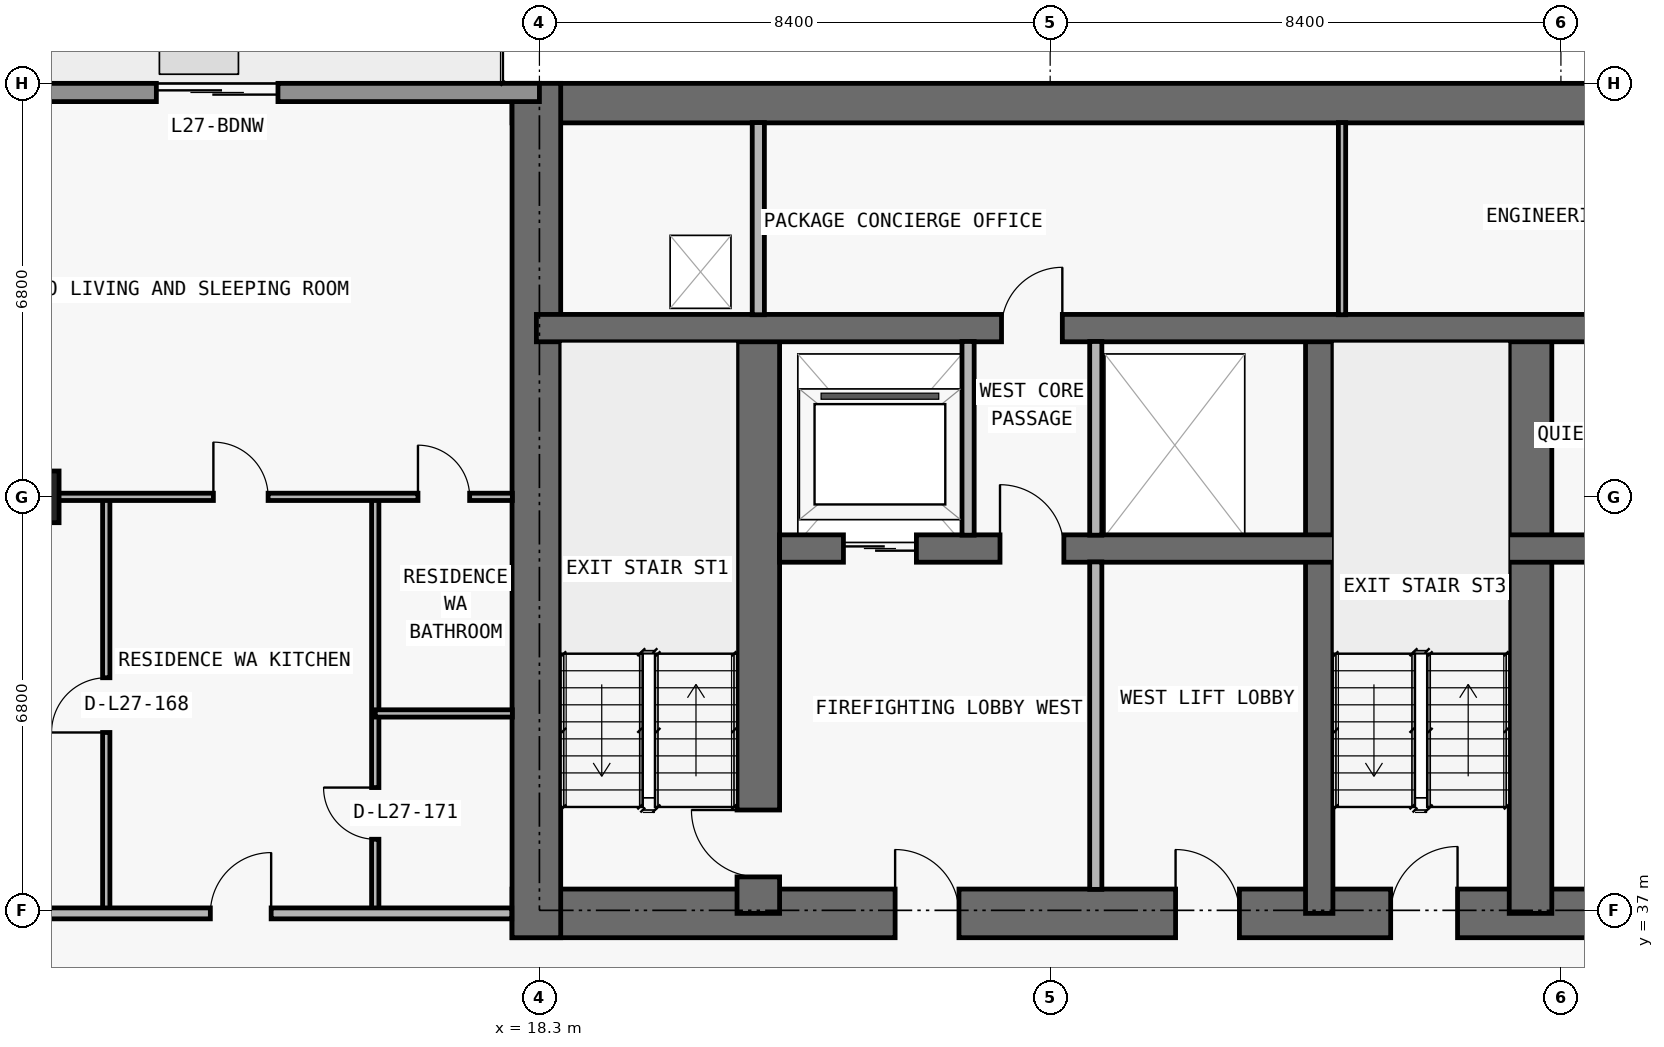
"""IFC4 building model, lengths in metres.
Left out: names, types, materials, properties, quantities, classifications, styles, units other than length and angle.
Written with IfcOpenShell. Run it as: python <this file> out.ifc"""

import sys

from ifc_helpers import new_model, si_unit, direction, frame, frame_2d, origin, origin_2d, place, context, subcontext, project, spatial, rectangle, extrude, element, fill, save


model = new_model("IFC4")
c1 = context("Model", 3, precision=1e-05, world=origin(), true_north=direction((0.0, 1.0)))
c2 = subcontext(c1, "Body", "Model", "MODEL_VIEW")
j1 = project(units=[si_unit("LENGTHUNIT", "METRE"), si_unit("PLANEANGLEUNIT", "RADIAN")], contexts=[c1])
p1 = place(None, origin())
s1 = spatial("IfcSite", under=j1, at=p1, CompositionType="ELEMENT")
p2 = place(p1, origin())
s2 = spatial("IfcBuilding", under=s1, at=p2, CompositionType="ELEMENT")
p3 = place(p2, frame((0.0, 0.0, 102.6)))
s3 = spatial("IfcBuildingStorey", under=s2, at=p3, CompositionType="ELEMENT", Elevation=102.6)
p4 = place(p3, frame((9.9, 43.8, 0.0), z_axis=(0.0, 0.0, 1.0), x_axis=(1.0, 0.0, 0.0)))
e1 = element("IfcColumn", 1, at=p4, inside=s3, PredefinedType="COLUMN", context=c2, shape_type="SweptSolid", body=[
    extrude(rectangle(XDim=1.0, YDim=0.85, at=origin_2d()), origin(), (0.0, 0.0, 1.0), 3.05),
])
p5 = place(p3, frame((17.85, 36.95, 0.0), z_axis=(0.0, 0.0, 1.0), x_axis=(1.0, 0.0, 0.0)))
e2 = element("IfcWall", 2, at=p5, inside=s3, PredefinedType="SHEAR", context=c2, shape_type="SweptSolid", body=[
    extrude(rectangle(XDim=42.1, YDim=0.8, at=frame_2d((21.05, 0.0))), origin(), (0.0, 0.0, 1.0), 3.05),
])
p6 = place(p5, frame((14.45, 0.0, 0.0)))
e3 = element("IfcOpeningElement", 3, at=p6, cuts=e2, PredefinedType="OPENING", context=c2, shape_type="SweptSolid", body=[
    extrude(rectangle(XDim=1.1, YDim=2.15, at=frame_2d((0.55, 1.075))), frame((0.0, 0.41, 0.0), z_axis=(0.0, -1.0, 0.0), x_axis=(1.0, 0.0, 0.0)), (0.0, 0.0, 1.0), 0.82),
])
p7 = place(p5, frame((6.3, 0.0, 0.0)))
e4 = element("IfcOpeningElement", 4, at=p7, cuts=e2, PredefinedType="OPENING", context=c2, shape_type="SweptSolid", body=[
    extrude(rectangle(XDim=1.05, YDim=2.15, at=frame_2d((0.525, 1.075))), frame((0.0, 0.41, 0.0), z_axis=(0.0, -1.0, 0.0), x_axis=(1.0, 0.0, 0.0)), (0.0, 0.0, 1.0), 0.82),
])
p8 = place(p5, frame((34.8, 0.0, 0.0)))
e5 = element("IfcOpeningElement", 5, at=p8, cuts=e2, PredefinedType="OPENING", context=c2, shape_type="SweptSolid", body=[
    extrude(rectangle(XDim=1.05, YDim=2.15, at=frame_2d((0.525, 1.075))), frame((0.0, 0.41, 0.0), z_axis=(0.0, -1.0, 0.0), x_axis=(1.0, 0.0, 0.0)), (0.0, 0.0, 1.0), 0.82),
])
p9 = place(p5, frame((10.913, 0.0, 0.0)))
e6 = element("IfcOpeningElement", 6, at=p9, cuts=e2, PredefinedType="OPENING", context=c2, shape_type="SweptSolid", body=[
    extrude(rectangle(XDim=1.05, YDim=2.15, at=frame_2d((0.525, 1.075))), frame((0.0, 0.41, 0.0), z_axis=(0.0, -1.0, 0.0), x_axis=(1.0, 0.0, 0.0)), (0.0, 0.0, 1.0), 0.82),
])
p10 = place(p5, frame((24.15, 0.0, 0.0)))
e7 = element("IfcOpeningElement", 7, at=p10, cuts=e2, PredefinedType="OPENING", context=c2, shape_type="SweptSolid", body=[
    extrude(rectangle(XDim=1.05, YDim=2.15, at=frame_2d((0.525, 1.075))), frame((0.0, 0.41, 0.0), z_axis=(0.0, -1.0, 0.0), x_axis=(1.0, 0.0, 0.0)), (0.0, 0.0, 1.0), 0.82),
])
p11 = place(p3, frame((17.85, 50.275, 0.0), z_axis=(0.0, 0.0, 1.0), x_axis=(1.0, 0.0, 0.0)))
e8 = element("IfcWall", 8, at=p11, inside=s3, PredefinedType="SHEAR", context=c2, shape_type="SweptSolid", body=[
    extrude(rectangle(XDim=42.1, YDim=0.65, at=frame_2d((21.05, 0.0))), origin(), (0.0, 0.0, 1.0), 3.05),
])
p12 = place(p3, frame((18.25, 36.55, 0.0), z_axis=(0.0, 0.0, 1.0), x_axis=(0.0, 1.0, 0.0)))
e9 = element("IfcWall", 9, at=p12, inside=s3, PredefinedType="SHEAR", context=c2, shape_type="SweptSolid", body=[
    extrude(rectangle(XDim=14.05, YDim=0.8, at=frame_2d((7.025, 0.0))), origin(), (0.0, 0.0, 1.0), 3.05),
])
p13 = place(p3, frame((21.9, 36.95, 0.0), z_axis=(0.0, 0.0, 1.0), x_axis=(0.0, 1.0, 0.0)))
e10 = element("IfcWall", 10, at=p13, inside=s3, PredefinedType="SHEAR", context=c2, shape_type="SweptSolid", body=[
    extrude(rectangle(XDim=9.625, YDim=0.7, at=frame_2d((4.812, 0.0))), origin(), (0.0, 0.0, 1.0), 3.05),
])
p14 = place(p13, frame((0.6, 0.0, 0.0)))
e11 = element("IfcOpeningElement", 11, at=p14, cuts=e10, PredefinedType="OPENING", context=c2, shape_type="SweptSolid", body=[
    extrude(rectangle(XDim=1.1, YDim=2.15, at=frame_2d((0.55, 1.075))), frame((0.0, 0.36, 0.0), z_axis=(0.0, -1.0, 0.0), x_axis=(1.0, 0.0, 0.0)), (0.0, 0.0, 1.0), 0.72),
])
p15 = place(p3, frame((31.125, 36.95, 0.0), z_axis=(0.0, 0.0, 1.0), x_axis=(0.0, 1.0, 0.0)))
e12 = element("IfcWall", 12, at=p15, inside=s3, PredefinedType="SHEAR", context=c2, shape_type="SweptSolid", body=[
    extrude(rectangle(XDim=9.625, YDim=0.45, at=frame_2d((4.812, 0.0))), origin(), (0.0, 0.0, 1.0), 3.05),
])
p16 = place(p3, frame((34.6, 36.95, 0.0), z_axis=(0.0, 0.0, 1.0), x_axis=(0.0, 1.0, 0.0)))
e13 = element("IfcWall", 13, at=p16, inside=s3, PredefinedType="SHEAR", context=c2, shape_type="SweptSolid", body=[
    extrude(rectangle(XDim=9.625, YDim=0.7, at=frame_2d((4.812, 0.0))), origin(), (0.0, 0.0, 1.0), 3.05),
])
p17 = place(p3, frame((22.25, 42.95, 0.0), z_axis=(0.0, 0.0, 1.0), x_axis=(1.0, 0.0, 0.0)))
e14 = element("IfcWall", 14, at=p17, inside=s3, PredefinedType="SHEAR", context=c2, shape_type="SweptSolid", body=[
    extrude(rectangle(XDim=33.3, YDim=0.45, at=frame_2d((16.65, 0.0))), origin(), (0.0, 0.0, 1.0), 3.05),
])
p18 = place(p17, frame((1.05, 0.0, 0.0)))
e15 = element("IfcOpeningElement", 15, at=p18, cuts=e14, PredefinedType="OPENING", context=c2, shape_type="SweptSolid", body=[
    extrude(rectangle(XDim=1.2, YDim=2.2, at=frame_2d((0.6, 1.1))), frame((0.0, 0.235, 0.0), z_axis=(0.0, -1.0, 0.0), x_axis=(1.0, 0.0, 0.0)), (0.0, 0.0, 1.0), 0.47),
])
p19 = place(p17, frame((31.05, 0.0, 0.0)))
e16 = element("IfcOpeningElement", 16, at=p19, cuts=e14, PredefinedType="OPENING", context=c2, shape_type="SweptSolid", body=[
    extrude(rectangle(XDim=1.2, YDim=2.2, at=frame_2d((0.6, 1.1))), frame((0.0, 0.235, 0.0), z_axis=(0.0, -1.0, 0.0), x_axis=(1.0, 0.0, 0.0)), (0.0, 0.0, 1.0), 0.47),
])
p20 = place(p17, frame((21.4, 0.0, 0.0)))
e17 = element("IfcOpeningElement", 17, at=p20, cuts=e14, PredefinedType="OPENING", context=c2, shape_type="SweptSolid", body=[
    extrude(rectangle(XDim=1.1, YDim=2.2, at=frame_2d((0.55, 1.1))), frame((0.0, 0.235, 0.0), z_axis=(0.0, -1.0, 0.0), x_axis=(1.0, 0.0, 0.0)), (0.0, 0.0, 1.0), 0.47),
])
p21 = place(p17, frame((24.0, 0.0, 0.0)))
e18 = element("IfcOpeningElement", 18, at=p21, cuts=e14, PredefinedType="OPENING", context=c2, shape_type="SweptSolid", body=[
    extrude(rectangle(XDim=1.1, YDim=2.2, at=frame_2d((0.55, 1.1))), frame((0.0, 0.235, 0.0), z_axis=(0.0, -1.0, 0.0), x_axis=(1.0, 0.0, 0.0)), (0.0, 0.0, 1.0), 0.47),
])
p22 = place(p17, frame((3.625, 0.0, 0.0)))
e19 = element("IfcOpeningElement", 19, at=p22, cuts=e14, PredefinedType="OPENING", context=c2, shape_type="SweptSolid", body=[
    extrude(rectangle(XDim=1.05, YDim=2.15, at=frame_2d((0.525, 1.075))), frame((0.0, 0.235, 0.0), z_axis=(0.0, -1.0, 0.0), x_axis=(1.0, 0.0, 0.0)), (0.0, 0.0, 1.0), 0.47),
])
p23 = place(p17, frame((28.675, 0.0, 0.0)))
e20 = element("IfcOpeningElement", 20, at=p23, cuts=e14, PredefinedType="OPENING", context=c2, shape_type="SweptSolid", body=[
    extrude(rectangle(XDim=1.05, YDim=2.15, at=frame_2d((0.525, 1.075))), frame((0.0, 0.235, 0.0), z_axis=(0.0, -1.0, 0.0), x_axis=(1.0, 0.0, 0.0)), (0.0, 0.0, 1.0), 0.47),
])
p24 = place(p17, frame((15.975, 0.0, 0.0)))
e21 = element("IfcOpeningElement", 21, at=p24, cuts=e14, PredefinedType="OPENING", context=c2, shape_type="SweptSolid", body=[
    extrude(rectangle(XDim=1.0, YDim=2.2, at=frame_2d((0.5, 1.1))), frame((0.0, 0.235, 0.0), z_axis=(0.0, -1.0, 0.0), x_axis=(1.0, 0.0, 0.0)), (0.0, 0.0, 1.0), 0.47),
])
p25 = place(p3, frame((18.25, 46.575, 0.0), z_axis=(0.0, 0.0, 1.0), x_axis=(1.0, 0.0, 0.0)))
e22 = element("IfcWall", 22, at=p25, inside=s3, PredefinedType="SHEAR", context=c2, shape_type="SweptSolid", body=[
    extrude(rectangle(XDim=41.3, YDim=0.45, at=frame_2d((20.65, 0.0))), origin(), (0.0, 0.0, 1.0), 3.05),
])
p26 = place(p25, frame((7.65, 0.0, 0.0)))
e23 = element("IfcOpeningElement", 23, at=p26, cuts=e22, PredefinedType="OPENING", context=c2, shape_type="SweptSolid", body=[
    extrude(rectangle(XDim=1.0, YDim=2.2, at=frame_2d((0.5, 1.1))), frame((0.0, 0.235, 0.0), z_axis=(0.0, -1.0, 0.0), x_axis=(1.0, 0.0, 0.0)), (0.0, 0.0, 1.0), 0.47),
])
p27 = place(p25, frame((32.675, 0.0, 0.0)))
e24 = element("IfcOpeningElement", 24, at=p27, cuts=e22, PredefinedType="OPENING", context=c2, shape_type="SweptSolid", body=[
    extrude(rectangle(XDim=1.05, YDim=2.15, at=frame_2d((0.525, 1.075))), frame((0.0, 0.235, 0.0), z_axis=(0.0, -1.0, 0.0), x_axis=(1.0, 0.0, 0.0)), (0.0, 0.0, 1.0), 0.47),
])
p28 = place(p3, frame((7.7, 50.45, 0.0), z_axis=(0.0, 0.0, 1.0), x_axis=(1.0, 0.0, 0.0)))
e25 = element("IfcWall", 25, at=p28, inside=s3, PredefinedType="STANDARD", context=c2, shape_type="SweptSolid", body=[
    extrude(rectangle(XDim=10.6, YDim=0.3, at=frame_2d((5.3, 0.0))), origin(), (0.0, 0.0, 1.0), 3.05),
])
p29 = place(p28, frame((4.3, 0.0, 0.0)))
e26 = element("IfcOpeningElement", 26, at=p29, cuts=e25, PredefinedType="OPENING", context=c2, shape_type="SweptSolid", body=[
    extrude(rectangle(XDim=2.0, YDim=2.3, at=frame_2d((1.0, 1.15))), frame((0.0, 0.16, 0.0), z_axis=(0.0, -1.0, 0.0), x_axis=(1.0, 0.0, 0.0)), (0.0, 0.0, 1.0), 0.32),
])
p30 = place(p3, frame((11.176, 36.95, 0.0), z_axis=(0.0, 0.0, 1.0), x_axis=(0.0, 1.0, 0.0)))
e27 = element("IfcWall", 27, at=p30, inside=s3, PredefinedType="PARTITIONING", context=c2, shape_type="SweptSolid", body=[
    extrude(rectangle(XDim=6.85, YDim=0.12, at=frame_2d((3.425, 0.0))), origin(), (0.0, 0.0, 1.0), 3.05),
])
p31 = place(p30, frame((2.975, 0.0, 0.0)))
e28 = element("IfcOpeningElement", 28, at=p31, cuts=e27, PredefinedType="OPENING", context=c2, shape_type="SweptSolid", body=[
    extrude(rectangle(XDim=0.9, YDim=2.15, at=frame_2d((0.45, 1.075))), frame((0.0, 0.07, 0.0), z_axis=(0.0, -1.0, 0.0), x_axis=(1.0, 0.0, 0.0)), (0.0, 0.0, 1.0), 0.14),
])
p32 = place(p3, frame((15.6, 36.95, 0.0), z_axis=(0.0, 0.0, 1.0), x_axis=(0.0, 1.0, 0.0)))
e29 = element("IfcWall", 29, at=p32, inside=s3, PredefinedType="PARTITIONING", context=c2, shape_type="SweptSolid", body=[
    extrude(rectangle(XDim=6.85, YDim=0.12, at=frame_2d((3.425, 0.0))), origin(), (0.0, 0.0, 1.0), 3.05),
])
p33 = place(p32, frame((1.219, 0.0, 0.0)))
e30 = element("IfcOpeningElement", 30, at=p33, cuts=e29, PredefinedType="OPENING", context=c2, shape_type="SweptSolid", body=[
    extrude(rectangle(XDim=0.85, YDim=2.1, at=frame_2d((0.425, 1.05))), frame((0.0, 0.07, 0.0), z_axis=(0.0, -1.0, 0.0), x_axis=(1.0, 0.0, 0.0)), (0.0, 0.0, 1.0), 0.14),
])
p34 = place(p3, frame((21.9, 46.795, 0.0), z_axis=(0.0, 0.0, 1.0), x_axis=(0.0, 1.0, 0.0)))
e31 = element("IfcWall", 31, at=p34, inside=s3, PredefinedType="PARTITIONING", context=c2, shape_type="SweptSolid", body=[
    extrude(rectangle(XDim=3.16, YDim=0.2, at=frame_2d((1.58, 0.0))), origin(), (0.0, 0.0, 1.0), 3.05),
])
p35 = place(p3, frame((25.35, 43.17, 0.0), z_axis=(0.0, 0.0, 1.0), x_axis=(0.0, 1.0, 0.0)))
e32 = element("IfcWall", 32, at=p35, inside=s3, PredefinedType="PARTITIONING", context=c2, shape_type="SweptSolid", body=[
    extrude(rectangle(XDim=3.185, YDim=0.2, at=frame_2d((1.593, 0.0))), origin(), (0.0, 0.0, 1.0), 3.05),
])
p36 = place(p3, frame((27.45, 37.345, 0.0), z_axis=(0.0, 0.0, 1.0), x_axis=(0.0, 1.0, 0.0)))
e33 = element("IfcWall", 33, at=p36, inside=s3, PredefinedType="PARTITIONING", context=c2, shape_type="SweptSolid", body=[
    extrude(rectangle(XDim=5.385, YDim=0.2, at=frame_2d((2.692, 0.0))), origin(), (0.0, 0.0, 1.0), 3.05),
])
p37 = place(p3, frame((27.45, 43.17, 0.0), z_axis=(0.0, 0.0, 1.0), x_axis=(0.0, 1.0, 0.0)))
e34 = element("IfcWall", 34, at=p37, inside=s3, PredefinedType="PARTITIONING", context=c2, shape_type="SweptSolid", body=[
    extrude(rectangle(XDim=3.185, YDim=0.2, at=frame_2d((1.593, 0.0))), origin(), (0.0, 0.0, 1.0), 3.05),
])
p38 = place(p3, frame((31.5, 46.795, 0.0), z_axis=(0.0, 0.0, 1.0), x_axis=(0.0, 1.0, 0.0)))
e35 = element("IfcWall", 35, at=p38, inside=s3, PredefinedType="PARTITIONING", context=c2, shape_type="SweptSolid", body=[
    extrude(rectangle(XDim=3.16, YDim=0.12, at=frame_2d((1.58, 0.0))), origin(), (0.0, 0.0, 1.0), 3.05),
])
p39 = place(p3, frame((7.7, 36.95, 0.0), z_axis=(0.0, 0.0, 1.0), x_axis=(1.0, 0.0, 0.0)))
e36 = element("IfcWall", 36, at=p39, inside=s3, PredefinedType="PARTITIONING", context=c2, shape_type="SweptSolid", body=[
    extrude(rectangle(XDim=10.145, YDim=0.18, at=frame_2d((5.073, 0.0))), origin(), (0.0, 0.0, 1.0), 3.05),
])
p40 = place(p39, frame((5.188, 0.0, 0.0)))
e37 = element("IfcOpeningElement", 37, at=p40, cuts=e36, PredefinedType="OPENING", context=c2, shape_type="SweptSolid", body=[
    extrude(rectangle(XDim=1.0, YDim=2.2, at=frame_2d((0.5, 1.1))), frame((0.0, 0.1, 0.0), z_axis=(0.0, -1.0, 0.0), x_axis=(1.0, 0.0, 0.0)), (0.0, 0.0, 1.0), 0.2),
])
p41 = place(p3, frame((15.6, 40.238, 0.0), z_axis=(0.0, 0.0, 1.0), x_axis=(1.0, 0.0, 0.0)))
e38 = element("IfcWall", 38, at=p41, inside=s3, PredefinedType="PARTITIONING", context=c2, shape_type="SweptSolid", body=[
    extrude(rectangle(XDim=2.255, YDim=0.12, at=frame_2d((1.127, 0.0))), origin(), (0.0, 0.0, 1.0), 3.05),
])
p42 = place(p3, frame((4.195, 43.8, 0.0), z_axis=(0.0, 0.0, 1.0), x_axis=(1.0, 0.0, 0.0)))
e39 = element("IfcWall", 39, at=p42, inside=s3, PredefinedType="PARTITIONING", context=c2, shape_type="SweptSolid", body=[
    extrude(rectangle(XDim=13.66, YDim=0.12, at=frame_2d((6.83, 0.0))), origin(), (0.0, 0.0, 1.0), 2.339),
])
p43 = place(p42, frame((8.743, 0.0, 0.0)))
e40 = element("IfcOpeningElement", 40, at=p43, cuts=e39, PredefinedType="OPENING", context=c2, shape_type="SweptSolid", body=[
    extrude(rectangle(XDim=0.9, YDim=2.15, at=frame_2d((0.45, 1.075))), frame((0.0, 0.07, 0.0), z_axis=(0.0, -1.0, 0.0), x_axis=(1.0, 0.0, 0.0)), (0.0, 0.0, 1.0), 0.14),
])
p44 = place(p42, frame((12.107, 0.0, 0.0)))
e41 = element("IfcOpeningElement", 41, at=p44, cuts=e39, PredefinedType="OPENING", context=c2, shape_type="SweptSolid", body=[
    extrude(rectangle(XDim=0.85, YDim=2.1, at=frame_2d((0.425, 1.05))), frame((0.0, 0.07, 0.0), z_axis=(0.0, -1.0, 0.0), x_axis=(1.0, 0.0, 0.0)), (0.0, 0.0, 1.0), 0.14),
])
p45 = place(p29, origin())
e42 = element("IfcDoor", 42, at=p45, inside=s3, OperationType="DOUBLE_DOOR_SLIDING", PredefinedType="DOOR", context=c2, shape_type="SweptSolid", body=[
    extrude(rectangle(XDim=2.0, YDim=2.3, at=frame_2d((1.0, 1.15))), frame((0.0, 0.025, 0.0), z_axis=(0.0, -1.0, 0.0), x_axis=(1.0, 0.0, 0.0)), (0.0, 0.0, 1.0), 0.05),
])
fill(e26, e42)
p46 = place(p18, origin())
e43 = element("IfcDoor", 43, at=p46, inside=s3, OperationType="DOUBLE_DOOR_SLIDING", PredefinedType="DOOR", context=c2, shape_type="SweptSolid", body=[
    extrude(rectangle(XDim=1.2, YDim=2.2, at=frame_2d((0.6, 1.1))), frame((0.0, 0.025, 0.0), z_axis=(0.0, -1.0, 0.0), x_axis=(1.0, 0.0, 0.0)), (0.0, 0.0, 1.0), 0.05),
])
fill(e15, e43)
p47 = place(p6, origin())
e44 = element("IfcDoor", 44, at=p47, inside=s3, OperationType="SINGLE_SWING_RIGHT", PredefinedType="DOOR", context=c2, shape_type="SweptSolid", body=[
    extrude(rectangle(XDim=1.1, YDim=2.15, at=frame_2d((0.55, 1.075))), frame((0.0, 0.025, 0.0), z_axis=(0.0, -1.0, 0.0), x_axis=(1.0, 0.0, 0.0)), (0.0, 0.0, 1.0), 0.05),
])
fill(e3, e44)
p48 = place(p7, origin())
e45 = element("IfcDoor", 45, at=p48, inside=s3, OperationType="SINGLE_SWING_LEFT", PredefinedType="DOOR", context=c2, shape_type="SweptSolid", body=[
    extrude(rectangle(XDim=1.05, YDim=2.15, at=frame_2d((0.525, 1.075))), frame((0.0, 0.025, 0.0), z_axis=(0.0, -1.0, 0.0), x_axis=(1.0, 0.0, 0.0)), (0.0, 0.0, 1.0), 0.05),
])
fill(e4, e45)
p49 = place(p14, origin())
e46 = element("IfcDoor", 46, at=p49, inside=s3, OperationType="SINGLE_SWING_RIGHT", PredefinedType="DOOR", context=c2, shape_type="SweptSolid", body=[
    extrude(rectangle(XDim=1.1, YDim=2.15, at=frame_2d((0.55, 1.075))), frame((0.0, 0.025, 0.0), z_axis=(0.0, -1.0, 0.0), x_axis=(1.0, 0.0, 0.0)), (0.0, 0.0, 1.0), 0.05),
])
fill(e11, e46)
p50 = place(p22, origin())
e47 = element("IfcDoor", 47, at=p50, inside=s3, OperationType="SINGLE_SWING_LEFT", PredefinedType="DOOR", context=c2, shape_type="SweptSolid", body=[
    extrude(rectangle(XDim=1.05, YDim=2.15, at=frame_2d((0.525, 1.075))), frame((0.0, 0.025, 0.0), z_axis=(0.0, -1.0, 0.0), x_axis=(1.0, 0.0, 0.0)), (0.0, 0.0, 1.0), 0.05),
])
fill(e19, e47)
p51 = place(p9, origin())
e48 = element("IfcDoor", 48, at=p51, inside=s3, OperationType="SINGLE_SWING_LEFT", PredefinedType="DOOR", context=c2, shape_type="SweptSolid", body=[
    extrude(rectangle(XDim=1.05, YDim=2.15, at=frame_2d((0.525, 1.075))), frame((0.0, 0.025, 0.0), z_axis=(0.0, -1.0, 0.0), x_axis=(1.0, 0.0, 0.0)), (0.0, 0.0, 1.0), 0.05),
])
fill(e6, e48)
p52 = place(p26, origin())
e49 = element("IfcDoor", 49, at=p52, inside=s3, OperationType="SINGLE_SWING_RIGHT", PredefinedType="DOOR", context=c2, shape_type="SweptSolid", body=[
    extrude(rectangle(XDim=1.0, YDim=2.2, at=frame_2d((0.5, 1.1))), frame((0.0, 0.025, 0.0), z_axis=(0.0, -1.0, 0.0), x_axis=(1.0, 0.0, 0.0)), (0.0, 0.0, 1.0), 0.05),
])
fill(e23, e49)
p53 = place(p31, origin())
e50 = element("IfcDoor", 50, at=p53, inside=s3, OperationType="SINGLE_SWING_LEFT", PredefinedType="DOOR", context=c2, shape_type="SweptSolid", body=[
    extrude(rectangle(XDim=0.9, YDim=2.15, at=frame_2d((0.45, 1.075))), frame((0.0, 0.025, 0.0), z_axis=(0.0, -1.0, 0.0), x_axis=(1.0, 0.0, 0.0)), (0.0, 0.0, 1.0), 0.05),
])
fill(e28, e50)
p54 = place(p40, origin())
e51 = element("IfcDoor", 51, at=p54, inside=s3, OperationType="SINGLE_SWING_RIGHT", PredefinedType="DOOR", context=c2, shape_type="SweptSolid", body=[
    extrude(rectangle(XDim=1.0, YDim=2.2, at=frame_2d((0.5, 1.1))), frame((0.0, 0.025, 0.0), z_axis=(0.0, -1.0, 0.0), x_axis=(1.0, 0.0, 0.0)), (0.0, 0.0, 1.0), 0.05),
])
fill(e37, e51)
p55 = place(p43, origin())
e52 = element("IfcDoor", 52, at=p55, inside=s3, OperationType="SINGLE_SWING_LEFT", PredefinedType="DOOR", context=c2, shape_type="SweptSolid", body=[
    extrude(rectangle(XDim=0.9, YDim=2.15, at=frame_2d((0.45, 1.075))), frame((0.0, 0.025, 0.0), z_axis=(0.0, -1.0, 0.0), x_axis=(1.0, 0.0, 0.0)), (0.0, 0.0, 1.0), 0.05),
])
fill(e40, e52)
p56 = place(p33, origin())
e53 = element("IfcDoor", 53, at=p56, inside=s3, OperationType="SINGLE_SWING_RIGHT", PredefinedType="DOOR", context=c2, shape_type="SweptSolid", body=[
    extrude(rectangle(XDim=0.85, YDim=2.1, at=frame_2d((0.425, 1.05))), frame((0.0, 0.025, 0.0), z_axis=(0.0, -1.0, 0.0), x_axis=(1.0, 0.0, 0.0)), (0.0, 0.0, 1.0), 0.05),
])
fill(e30, e53)
p57 = place(p44, origin())
e54 = element("IfcDoor", 54, at=p57, inside=s3, OperationType="SINGLE_SWING_LEFT", PredefinedType="DOOR", context=c2, shape_type="SweptSolid", body=[
    extrude(rectangle(XDim=0.85, YDim=2.1, at=frame_2d((0.425, 1.05))), frame((0.0, 0.025, 0.0), z_axis=(0.0, -1.0, 0.0), x_axis=(1.0, 0.0, 0.0)), (0.0, 0.0, 1.0), 0.05),
])
fill(e41, e54)
save(model, sys.argv[1])
